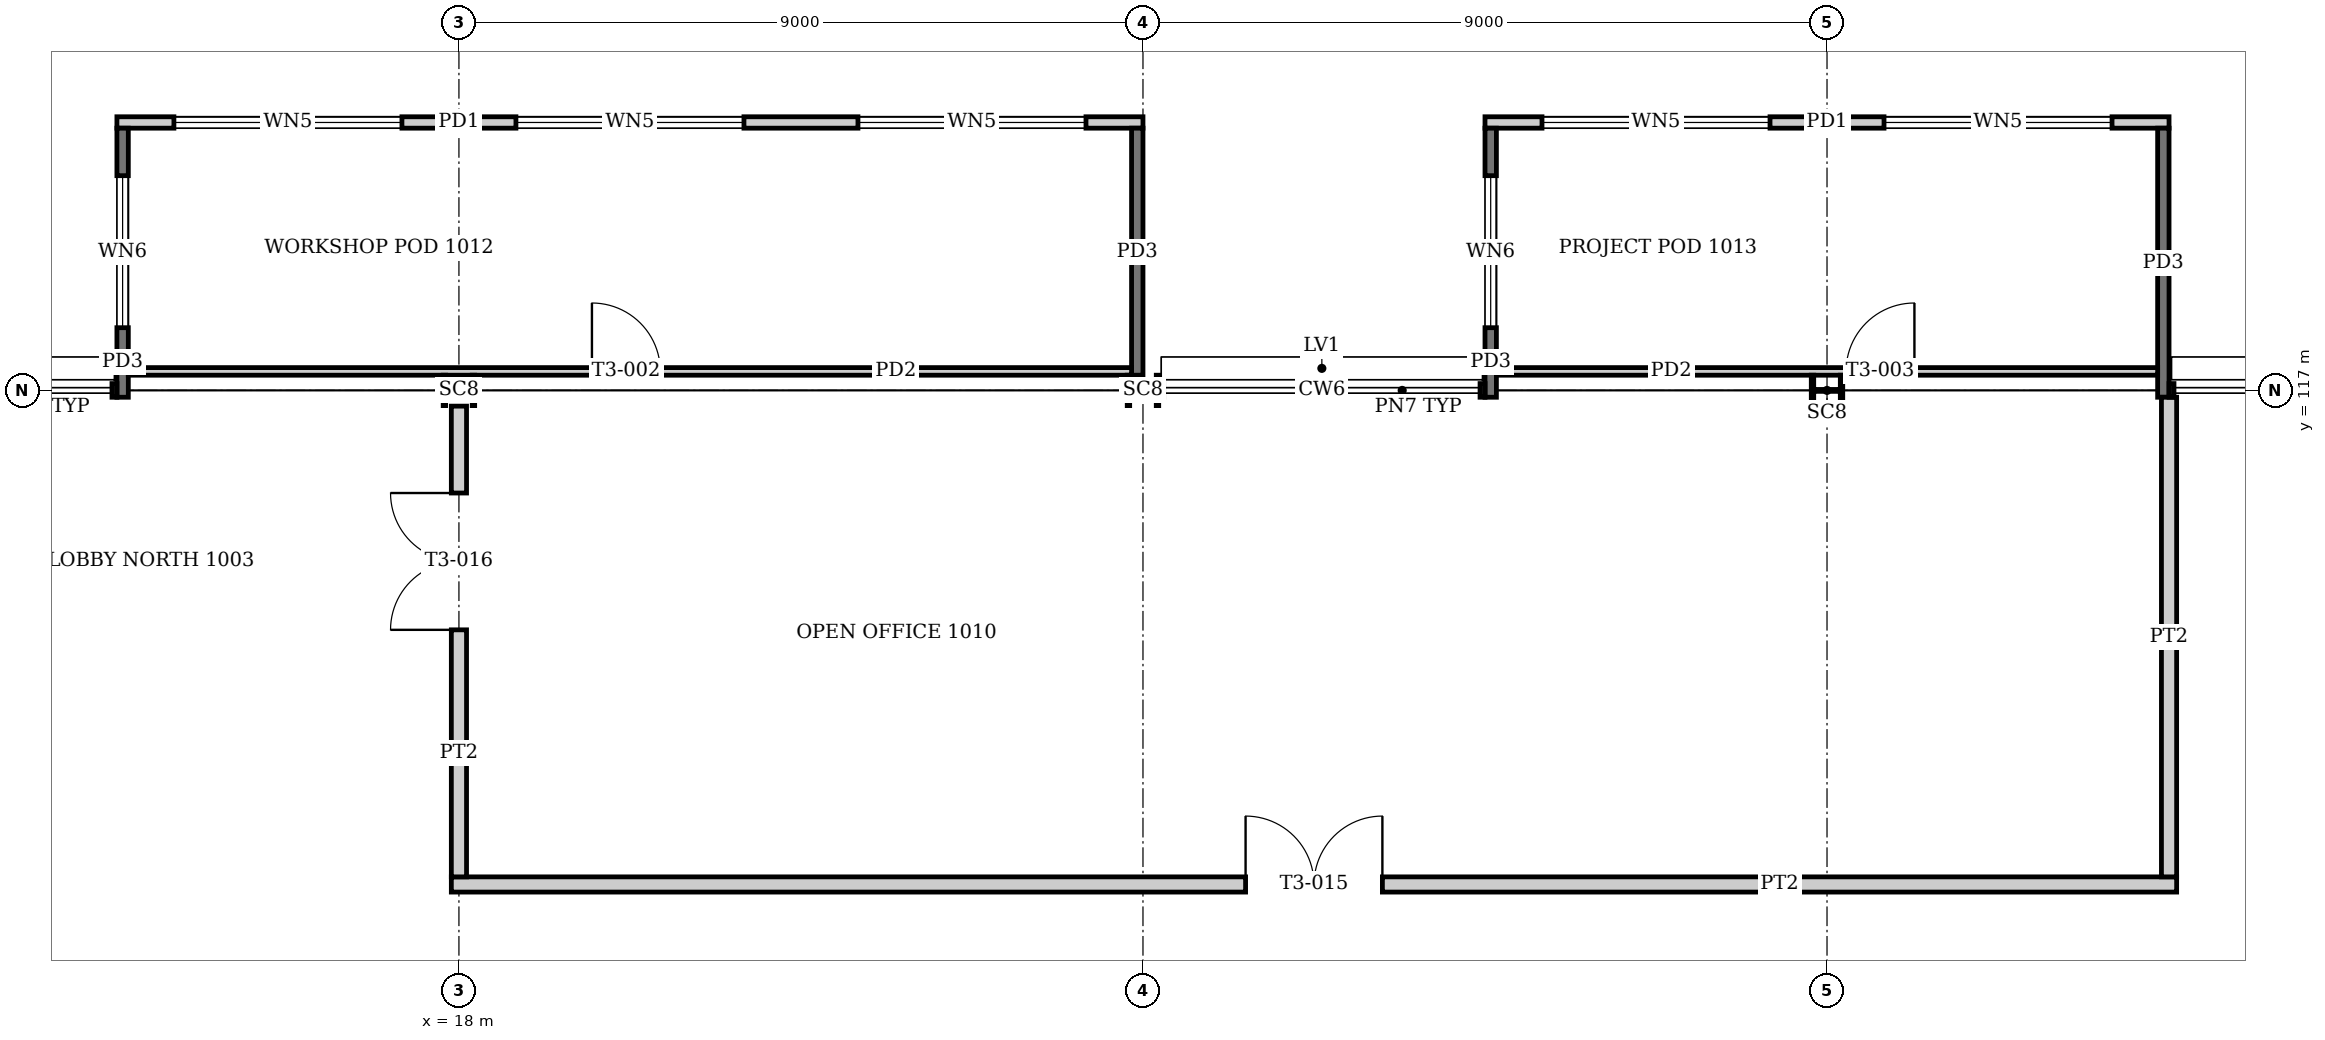
"""IFC4 building model, lengths in metres.
Left out: names, types, materials, properties, quantities, classifications, styles, units other than length and angle.
Written with IfcOpenShell. Run it as: python <this file> out.ifc"""

import sys

from ifc_helpers import new_model, si_unit, direction, frame, frame_2d, origin, origin_2d, place, context, subcontext, project, spatial, rectangle, i_section, extrude, element, fill, save


model = new_model("IFC4")
c1 = context("Model", 3, precision=1e-05, world=origin(), true_north=direction((0.0, 1.0)))
c2 = subcontext(c1, "Body", "Model", "MODEL_VIEW")
j1 = project(units=[si_unit("LENGTHUNIT", "METRE"), si_unit("PLANEANGLEUNIT", "RADIAN")], contexts=[c1])
p1 = place(None, origin())
s1 = spatial("IfcSite", under=j1, at=p1, CompositionType="ELEMENT")
p2 = place(p1, origin())
s2 = spatial("IfcBuilding", under=s1, at=p2, CompositionType="ELEMENT")
p3 = place(p2, frame((0.0, 0.0, 43.2)))
s3 = spatial("IfcBuildingStorey", under=s2, at=p3, CompositionType="ELEMENT", Elevation=43.2)
for number, where, z_axis, x_axis in (
    (1, (18.0, 117.0, 0.0), (0.0, 0.0, 1.0), (0.0, 1.0, 0.0)),
    (2, (27.0, 117.0, 0.0), (0.0, 0.0, 1.0), (0.0, 1.0, 0.0)),
    (3, (36.0, 117.0, 0.0), (0.0, 0.0, 1.0), (0.0, 1.0, 0.0)),
):
    element("IfcColumn", number, at=place(p3, frame(where, z_axis=z_axis, x_axis=x_axis)), inside=s3, PredefinedType="COLUMN", context=c2, shape_type="SweptSolid", body=[
        extrude(i_section(OverallWidth=0.4, OverallDepth=0.414, WebThickness=0.025, FlangeThickness=0.032, at=origin_2d()), origin(), (0.0, 0.0, 1.0), 4.0),
    ])
p4 = place(p3, frame((13.5, 120.525, 0.0), z_axis=(0.0, 0.0, 1.0), x_axis=(1.0, 0.0, 0.0)))
e4 = element("IfcWall", 4, at=p4, inside=s3, PredefinedType="SOLIDWALL", context=c2, shape_type="SweptSolid", body=[
    extrude(rectangle(XDim=13.5, YDim=0.15, at=frame_2d((6.75, 0.0))), origin(), (0.0, 0.0, 1.0), 2.6),
])
p5 = place(p4, frame((0.75, 0.0, 0.9)))
e5 = element("IfcOpeningElement", 5, at=p5, cuts=e4, PredefinedType="OPENING", context=c2, shape_type="SweptSolid", body=[
    extrude(rectangle(XDim=3.0, YDim=1.4, at=frame_2d((1.5, 0.7))), frame((0.0, 0.085, 0.0), z_axis=(0.0, -1.0, 0.0), x_axis=(1.0, 0.0, 0.0)), (0.0, 0.0, 1.0), 0.17),
])
p6 = place(p4, frame((5.25, 0.0, 0.9)))
e6 = element("IfcOpeningElement", 6, at=p6, cuts=e4, PredefinedType="OPENING", context=c2, shape_type="SweptSolid", body=[
    extrude(rectangle(XDim=3.0, YDim=1.4, at=frame_2d((1.5, 0.7))), frame((0.0, 0.085, 0.0), z_axis=(0.0, -1.0, 0.0), x_axis=(1.0, 0.0, 0.0)), (0.0, 0.0, 1.0), 0.17),
])
p7 = place(p4, frame((9.75, 0.0, 0.9)))
e7 = element("IfcOpeningElement", 7, at=p7, cuts=e4, PredefinedType="OPENING", context=c2, shape_type="SweptSolid", body=[
    extrude(rectangle(XDim=3.0, YDim=1.4, at=frame_2d((1.5, 0.7))), frame((0.0, 0.085, 0.0), z_axis=(0.0, -1.0, 0.0), x_axis=(1.0, 0.0, 0.0)), (0.0, 0.0, 1.0), 0.17),
])
p8 = place(p3, frame((13.575, 120.45, -0.15), z_axis=(0.0, 0.0, 1.0), x_axis=(0.0, -1.0, 0.0)))
e8 = element("IfcWall", 8, at=p8, inside=s3, PredefinedType="SOLIDWALL", context=c2, shape_type="SweptSolid", body=[
    extrude(rectangle(XDim=3.54, YDim=0.15, at=frame_2d((1.77, 0.0))), origin(), (0.0, 0.0, 1.0), 2.75),
])
p9 = place(p8, frame((0.625, 0.0, 1.05)))
e9 = element("IfcOpeningElement", 9, at=p9, cuts=e8, PredefinedType="OPENING", context=c2, shape_type="SweptSolid", body=[
    extrude(rectangle(XDim=2.0, YDim=1.4, at=frame_2d((1.0, 0.7))), frame((0.0, 0.085, 0.0), z_axis=(0.0, -1.0, 0.0), x_axis=(1.0, 0.0, 0.0)), (0.0, 0.0, 1.0), 0.17),
])
p10 = place(p3, frame((26.925, 120.45, -0.15), z_axis=(0.0, 0.0, 1.0), x_axis=(0.0, -1.0, 0.0)))
e10 = element("IfcWall", 10, at=p10, inside=s3, PredefinedType="SOLIDWALL", context=c2, shape_type="SweptSolid", body=[
    extrude(rectangle(XDim=3.25, YDim=0.15, at=frame_2d((1.625, 0.0))), origin(), (0.0, 0.0, 1.0), 2.75),
])
p11 = place(p3, frame((13.65, 117.25, 0.0), z_axis=(0.0, 0.0, 1.0), x_axis=(1.0, 0.0, 0.0)))
e11 = element("IfcWall", 11, at=p11, inside=s3, PredefinedType="PARTITIONING", context=c2, shape_type="SweptSolid", body=[
    extrude(rectangle(XDim=13.2, YDim=0.1, at=frame_2d((6.6, 0.0))), origin(), (0.0, 0.0, 1.0), 2.6),
])
p12 = place(p11, frame((6.1, 0.0, 0.0)))
e12 = element("IfcOpeningElement", 12, at=p12, cuts=e11, PredefinedType="OPENING", context=c2, shape_type="SweptSolid", body=[
    extrude(rectangle(XDim=0.9, YDim=2.1, at=frame_2d((0.45, 1.05))), frame((0.0, 0.06, 0.0), z_axis=(0.0, -1.0, 0.0), x_axis=(1.0, 0.0, 0.0)), (0.0, 0.0, 1.0), 0.12),
])
p13 = place(p3, frame((31.5, 120.525, 0.0), z_axis=(0.0, 0.0, 1.0), x_axis=(1.0, 0.0, 0.0)))
e13 = element("IfcWall", 13, at=p13, inside=s3, PredefinedType="SOLIDWALL", context=c2, shape_type="SweptSolid", body=[
    extrude(rectangle(XDim=9.0, YDim=0.15, at=frame_2d((4.5, 0.0))), origin(), (0.0, 0.0, 1.0), 2.6),
])
p14 = place(p13, frame((0.75, 0.0, 0.9)))
e14 = element("IfcOpeningElement", 14, at=p14, cuts=e13, PredefinedType="OPENING", context=c2, shape_type="SweptSolid", body=[
    extrude(rectangle(XDim=3.0, YDim=1.4, at=frame_2d((1.5, 0.7))), frame((0.0, 0.085, 0.0), z_axis=(0.0, -1.0, 0.0), x_axis=(1.0, 0.0, 0.0)), (0.0, 0.0, 1.0), 0.17),
])
p15 = place(p13, frame((5.25, 0.0, 0.9)))
e15 = element("IfcOpeningElement", 15, at=p15, cuts=e13, PredefinedType="OPENING", context=c2, shape_type="SweptSolid", body=[
    extrude(rectangle(XDim=3.0, YDim=1.4, at=frame_2d((1.5, 0.7))), frame((0.0, 0.085, 0.0), z_axis=(0.0, -1.0, 0.0), x_axis=(1.0, 0.0, 0.0)), (0.0, 0.0, 1.0), 0.17),
])
p16 = place(p3, frame((31.575, 120.45, -0.15), z_axis=(0.0, 0.0, 1.0), x_axis=(0.0, -1.0, 0.0)))
e16 = element("IfcWall", 16, at=p16, inside=s3, PredefinedType="SOLIDWALL", context=c2, shape_type="SweptSolid", body=[
    extrude(rectangle(XDim=3.54, YDim=0.15, at=frame_2d((1.77, 0.0))), origin(), (0.0, 0.0, 1.0), 2.75),
])
p17 = place(p16, frame((0.625, 0.0, 1.05)))
e17 = element("IfcOpeningElement", 17, at=p17, cuts=e16, PredefinedType="OPENING", context=c2, shape_type="SweptSolid", body=[
    extrude(rectangle(XDim=2.0, YDim=1.4, at=frame_2d((1.0, 0.7))), frame((0.0, 0.085, 0.0), z_axis=(0.0, -1.0, 0.0), x_axis=(1.0, 0.0, 0.0)), (0.0, 0.0, 1.0), 0.17),
])
p18 = place(p3, frame((40.425, 120.45, -0.15), z_axis=(0.0, 0.0, 1.0), x_axis=(0.0, -1.0, 0.0)))
e18 = element("IfcWall", 18, at=p18, inside=s3, PredefinedType="SOLIDWALL", context=c2, shape_type="SweptSolid", body=[
    extrude(rectangle(XDim=3.54, YDim=0.15, at=frame_2d((1.77, 0.0))), origin(), (0.0, 0.0, 1.0), 2.75),
])
p19 = place(p3, frame((31.65, 117.25, 0.0), z_axis=(0.0, 0.0, 1.0), x_axis=(1.0, 0.0, 0.0)))
e19 = element("IfcWall", 19, at=p19, inside=s3, PredefinedType="PARTITIONING", context=c2, shape_type="SweptSolid", body=[
    extrude(rectangle(XDim=8.7, YDim=0.1, at=frame_2d((4.35, 0.0))), origin(), (0.0, 0.0, 1.0), 2.6),
])
p20 = place(p19, frame((4.6, 0.0, 0.0)))
e20 = element("IfcOpeningElement", 20, at=p20, cuts=e19, PredefinedType="OPENING", context=c2, shape_type="SweptSolid", body=[
    extrude(rectangle(XDim=0.9, YDim=2.1, at=frame_2d((0.45, 1.05))), frame((0.0, 0.06, 0.0), z_axis=(0.0, -1.0, 0.0), x_axis=(1.0, 0.0, 0.0)), (0.0, 0.0, 1.0), 0.12),
])
p21 = place(p3, frame((17.9, 110.5, 0.0), z_axis=(0.0, 0.0, 1.0), x_axis=(1.0, 0.0, 0.0)))
e21 = element("IfcWall", 21, at=p21, inside=s3, PredefinedType="PARTITIONING", context=c2, shape_type="SweptSolid", body=[
    extrude(rectangle(XDim=22.7, YDim=0.2, at=frame_2d((11.35, 0.0))), origin(), (0.0, 0.0, 1.0), 3.05),
])
p22 = place(p21, frame((10.45, 0.0, 0.0)))
e22 = element("IfcOpeningElement", 22, at=p22, cuts=e21, PredefinedType="OPENING", context=c2, shape_type="SweptSolid", body=[
    extrude(rectangle(XDim=1.8, YDim=2.1, at=frame_2d((0.9, 1.05))), frame((0.0, 0.11, 0.0), z_axis=(0.0, -1.0, 0.0), x_axis=(1.0, 0.0, 0.0)), (0.0, 0.0, 1.0), 0.22),
])
p23 = place(p3, frame((18.0, 110.6, 0.0), z_axis=(0.0, 0.0, 1.0), x_axis=(0.0, 1.0, 0.0)))
e23 = element("IfcWall", 23, at=p23, inside=s3, PredefinedType="PARTITIONING", context=c2, shape_type="SweptSolid", body=[
    extrude(rectangle(XDim=6.193, YDim=0.2, at=frame_2d((3.096, 0.0))), origin(), (0.0, 0.0, 1.0), 3.05),
])
p24 = place(p23, frame((3.25, 0.0, 0.0)))
e24 = element("IfcOpeningElement", 24, at=p24, cuts=e23, PredefinedType="OPENING", context=c2, shape_type="SweptSolid", body=[
    extrude(rectangle(XDim=1.8, YDim=2.1, at=frame_2d((0.9, 1.05))), frame((0.0, 0.11, 0.0), z_axis=(0.0, -1.0, 0.0), x_axis=(1.0, 0.0, 0.0)), (0.0, 0.0, 1.0), 0.22),
])
p25 = place(p3, frame((40.5, 110.6, 0.0), z_axis=(0.0, 0.0, 1.0), x_axis=(0.0, 1.0, 0.0)))
e25 = element("IfcWall", 25, at=p25, inside=s3, PredefinedType="PARTITIONING", context=c2, shape_type="SweptSolid", body=[
    extrude(rectangle(XDim=6.31, YDim=0.2, at=frame_2d((3.155, 0.0))), origin(), (0.0, 0.0, 1.0), 3.05),
])
p26 = place(p5, origin())
e26 = element("IfcWindow", 26, at=p26, inside=s3, PartitioningType="SINGLE_PANEL", PredefinedType="WINDOW", context=c2, shape_type="SweptSolid", body=[
    extrude(rectangle(XDim=3.0, YDim=1.4, at=frame_2d((1.5, 0.7))), frame((0.0, 0.03, 0.0), z_axis=(0.0, -1.0, 0.0), x_axis=(1.0, 0.0, 0.0)), (0.0, 0.0, 1.0), 0.06),
])
fill(e5, e26)
p27 = place(p6, origin())
e27 = element("IfcWindow", 27, at=p27, inside=s3, PartitioningType="SINGLE_PANEL", PredefinedType="WINDOW", context=c2, shape_type="SweptSolid", body=[
    extrude(rectangle(XDim=3.0, YDim=1.4, at=frame_2d((1.5, 0.7))), frame((0.0, 0.03, 0.0), z_axis=(0.0, -1.0, 0.0), x_axis=(1.0, 0.0, 0.0)), (0.0, 0.0, 1.0), 0.06),
])
fill(e6, e27)
p28 = place(p7, origin())
e28 = element("IfcWindow", 28, at=p28, inside=s3, PartitioningType="SINGLE_PANEL", PredefinedType="WINDOW", context=c2, shape_type="SweptSolid", body=[
    extrude(rectangle(XDim=3.0, YDim=1.4, at=frame_2d((1.5, 0.7))), frame((0.0, 0.03, 0.0), z_axis=(0.0, -1.0, 0.0), x_axis=(1.0, 0.0, 0.0)), (0.0, 0.0, 1.0), 0.06),
])
fill(e7, e28)
p29 = place(p9, origin())
e29 = element("IfcWindow", 29, at=p29, inside=s3, PartitioningType="SINGLE_PANEL", PredefinedType="WINDOW", context=c2, shape_type="SweptSolid", body=[
    extrude(rectangle(XDim=2.0, YDim=1.4, at=frame_2d((1.0, 0.7))), frame((0.0, 0.03, 0.0), z_axis=(0.0, -1.0, 0.0), x_axis=(1.0, 0.0, 0.0)), (0.0, 0.0, 1.0), 0.06),
])
fill(e9, e29)
p30 = place(p12, origin())
e30 = element("IfcDoor", 30, at=p30, inside=s3, OperationType="SINGLE_SWING_LEFT", PredefinedType="DOOR", context=c2, shape_type="SweptSolid", body=[
    extrude(rectangle(XDim=0.9, YDim=2.1, at=frame_2d((0.45, 1.05))), frame((0.0, 0.025, 0.0), z_axis=(0.0, -1.0, 0.0), x_axis=(1.0, 0.0, 0.0)), (0.0, 0.0, 1.0), 0.05),
])
fill(e12, e30)
p31 = place(p14, origin())
e31 = element("IfcWindow", 31, at=p31, inside=s3, PartitioningType="SINGLE_PANEL", PredefinedType="WINDOW", context=c2, shape_type="SweptSolid", body=[
    extrude(rectangle(XDim=3.0, YDim=1.4, at=frame_2d((1.5, 0.7))), frame((0.0, 0.03, 0.0), z_axis=(0.0, -1.0, 0.0), x_axis=(1.0, 0.0, 0.0)), (0.0, 0.0, 1.0), 0.06),
])
fill(e14, e31)
p32 = place(p15, origin())
e32 = element("IfcWindow", 32, at=p32, inside=s3, PartitioningType="SINGLE_PANEL", PredefinedType="WINDOW", context=c2, shape_type="SweptSolid", body=[
    extrude(rectangle(XDim=3.0, YDim=1.4, at=frame_2d((1.5, 0.7))), frame((0.0, 0.03, 0.0), z_axis=(0.0, -1.0, 0.0), x_axis=(1.0, 0.0, 0.0)), (0.0, 0.0, 1.0), 0.06),
])
fill(e15, e32)
p33 = place(p17, origin())
e33 = element("IfcWindow", 33, at=p33, inside=s3, PartitioningType="SINGLE_PANEL", PredefinedType="WINDOW", context=c2, shape_type="SweptSolid", body=[
    extrude(rectangle(XDim=2.0, YDim=1.4, at=frame_2d((1.0, 0.7))), frame((0.0, 0.03, 0.0), z_axis=(0.0, -1.0, 0.0), x_axis=(1.0, 0.0, 0.0)), (0.0, 0.0, 1.0), 0.06),
])
fill(e17, e33)
p34 = place(p20, origin())
e34 = element("IfcDoor", 34, at=p34, inside=s3, OperationType="SINGLE_SWING_RIGHT", PredefinedType="DOOR", context=c2, shape_type="SweptSolid", body=[
    extrude(rectangle(XDim=0.9, YDim=2.1, at=frame_2d((0.45, 1.05))), frame((0.0, 0.025, 0.0), z_axis=(0.0, -1.0, 0.0), x_axis=(1.0, 0.0, 0.0)), (0.0, 0.0, 1.0), 0.05),
])
fill(e20, e34)
p35 = place(p22, origin())
e35 = element("IfcDoor", 35, at=p35, inside=s3, OperationType="DOUBLE_DOOR_SINGLE_SWING", PredefinedType="DOOR", context=c2, shape_type="SweptSolid", body=[
    extrude(rectangle(XDim=1.8, YDim=2.1, at=frame_2d((0.9, 1.05))), frame((0.0, 0.025, 0.0), z_axis=(0.0, -1.0, 0.0), x_axis=(1.0, 0.0, 0.0)), (0.0, 0.0, 1.0), 0.05),
])
fill(e22, e35)
p36 = place(p24, origin())
e36 = element("IfcDoor", 36, at=p36, inside=s3, OperationType="DOUBLE_DOOR_SINGLE_SWING", PredefinedType="DOOR", context=c2, shape_type="SweptSolid", body=[
    extrude(rectangle(XDim=1.8, YDim=2.1, at=frame_2d((0.9, 1.05))), frame((0.0, 0.025, 0.0), z_axis=(0.0, -1.0, 0.0), x_axis=(1.0, 0.0, 0.0)), (0.0, 0.0, 1.0), 0.05),
])
fill(e24, e36)
save(model, sys.argv[1])
